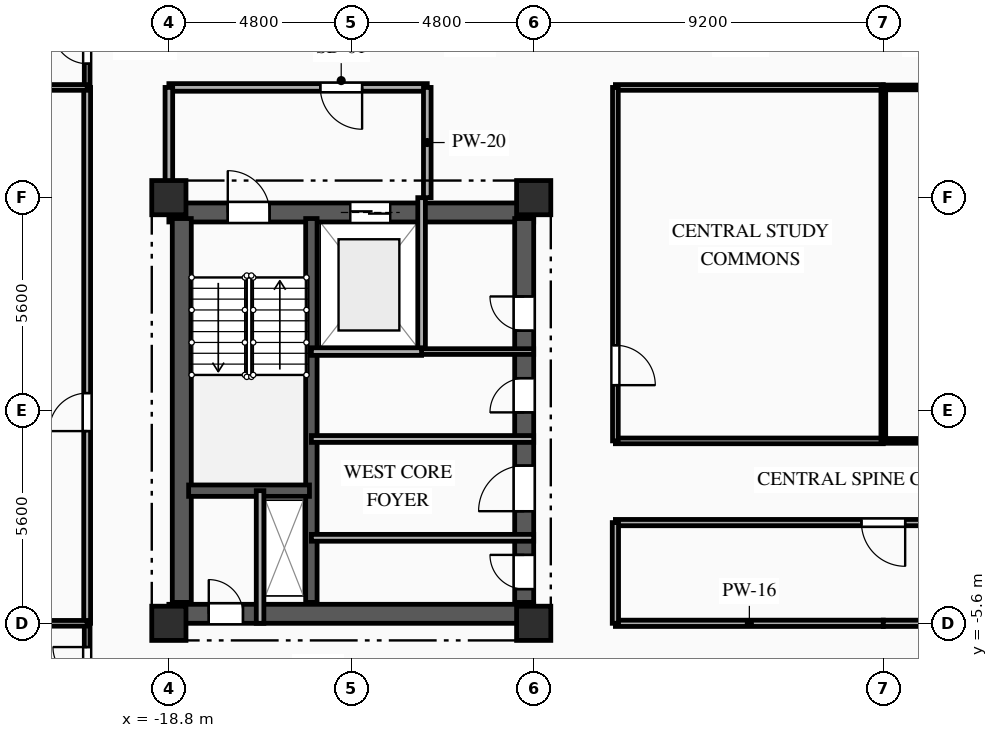
"""IFC4 building model, lengths in metres.
Left out: names, types, materials, properties, quantities, classifications, styles, units other than length and angle.
Written with IfcOpenShell. Run it as: python <this file> out.ifc"""

import sys

from ifc_helpers import new_model, si_unit, direction, frame, frame_2d, origin, origin_2d, place, context, subcontext, project, spatial, rectangle, extrude, element, fill, save


model = new_model("IFC4")
c1 = context("Model", 3, precision=1e-05, world=origin(), true_north=direction((0.0, 1.0)))
c2 = subcontext(c1, "Body", "Model", "MODEL_VIEW")
j1 = project(units=[si_unit("LENGTHUNIT", "METRE"), si_unit("PLANEANGLEUNIT", "RADIAN")], contexts=[c1])
p1 = place(None, origin())
s1 = spatial("IfcSite", under=j1, at=p1, CompositionType="ELEMENT")
p2 = place(p1, origin())
s2 = spatial("IfcBuilding", under=s1, at=p2, CompositionType="ELEMENT")
p3 = place(p2, frame((0.0, 0.0, 137.7)))
s3 = spatial("IfcBuildingStorey", under=s2, at=p3, CompositionType="ELEMENT", Elevation=137.7)
for number, where, z_axis, x_axis in (
    (1, (-18.8, -5.6, 0.0), (0.0, 0.0, 1.0), (1.0, 0.0, 0.0)),
    (2, (-18.8, 5.6, 0.0), (0.0, 0.0, 1.0), (1.0, 0.0, 0.0)),
    (3, (-9.2, -5.6, 0.0), (0.0, 0.0, 1.0), (1.0, 0.0, 0.0)),
    (4, (-9.2, 5.6, 0.0), (0.0, 0.0, 1.0), (1.0, 0.0, 0.0)),
):
    element("IfcColumn", number, at=place(p3, frame(where, z_axis=z_axis, x_axis=x_axis)), inside=s3, PredefinedType="COLUMN", context=c2, shape_type="SweptSolid", body=[
        extrude(rectangle(XDim=0.9, YDim=0.9, at=origin_2d()), origin(), (0.0, 0.0, 1.0), 3.35),
    ])
p4 = place(p3, frame((-18.8, 5.21, 0.0), z_axis=(0.0, 0.0, 1.0), x_axis=(1.0, 0.0, 0.0)))
e5 = element("IfcWall", 5, at=p4, inside=s3, PredefinedType="SHEAR", context=c2, shape_type="SweptSolid", body=[
    extrude(rectangle(XDim=9.6, YDim=0.5, at=frame_2d((4.8, 0.0))), origin(), (0.0, 0.0, 1.0), 3.04),
])
p5 = place(p4, frame((1.55, 0.0, 0.0)))
e6 = element("IfcOpeningElement", 6, at=p5, cuts=e5, PredefinedType="OPENING", context=c2, shape_type="SweptSolid", body=[
    extrude(rectangle(XDim=1.1, YDim=2.15, at=frame_2d((0.55, 1.075))), frame((0.0, 0.26, 0.0), z_axis=(0.0, -1.0, 0.0), x_axis=(1.0, 0.0, 0.0)), (0.0, 0.0, 1.0), 0.52),
])
p6 = place(p4, frame((4.775, 0.0, 0.0)))
e7 = element("IfcOpeningElement", 7, at=p6, cuts=e5, PredefinedType="OPENING", context=c2, shape_type="SweptSolid", body=[
    extrude(rectangle(XDim=1.05, YDim=2.1, at=frame_2d((0.525, 1.05))), frame((0.0, 0.26, 0.0), z_axis=(0.0, -1.0, 0.0), x_axis=(1.0, 0.0, 0.0)), (0.0, 0.0, 1.0), 0.52),
])
p7 = place(p3, frame((-18.8, -5.35, 0.0), z_axis=(0.0, 0.0, 1.0), x_axis=(1.0, 0.0, 0.0)))
e8 = element("IfcWall", 8, at=p7, inside=s3, PredefinedType="SHEAR", context=c2, shape_type="SweptSolid", body=[
    extrude(rectangle(XDim=9.6, YDim=0.5, at=frame_2d((4.8, 0.0))), origin(), (0.0, 0.0, 1.0), 3.04),
])
p8 = place(p7, frame((1.05, 0.0, 0.0)))
e9 = element("IfcOpeningElement", 9, at=p8, cuts=e8, PredefinedType="OPENING", context=c2, shape_type="SweptSolid", body=[
    extrude(rectangle(XDim=0.9, YDim=2.1, at=frame_2d((0.45, 1.05))), frame((0.0, 0.26, 0.0), z_axis=(0.0, -1.0, 0.0), x_axis=(1.0, 0.0, 0.0)), (0.0, 0.0, 1.0), 0.52),
])
p9 = place(p3, frame((-18.46, -5.05, 0.0), z_axis=(0.0, 0.0, 1.0), x_axis=(0.0, 1.0, 0.0)))
e10 = element("IfcWall", 10, at=p9, inside=s3, PredefinedType="SHEAR", context=c2, shape_type="SweptSolid", body=[
    extrude(rectangle(XDim=10.1, YDim=0.5, at=frame_2d((5.05, 0.0))), origin(), (0.0, 0.0, 1.0), 3.04),
])
p10 = place(p3, frame((-9.45, -5.05, 0.0), z_axis=(0.0, 0.0, 1.0), x_axis=(0.0, 1.0, 0.0)))
e11 = element("IfcWall", 11, at=p10, inside=s3, PredefinedType="SHEAR", context=c2, shape_type="SweptSolid", body=[
    extrude(rectangle(XDim=10.1, YDim=0.5, at=frame_2d((5.05, 0.0))), origin(), (0.0, 0.0, 1.0), 3.04),
])
p11 = place(p10, frame((7.15, 0.0, 0.0)))
e12 = element("IfcOpeningElement", 12, at=p11, cuts=e11, PredefinedType="OPENING", context=c2, shape_type="SweptSolid", body=[
    extrude(rectangle(XDim=0.9, YDim=2.1, at=frame_2d((0.45, 1.05))), frame((0.0, 0.26, 0.0), z_axis=(0.0, -1.0, 0.0), x_axis=(1.0, 0.0, 0.0)), (0.0, 0.0, 1.0), 0.52),
])
p12 = place(p10, frame((2.4, 0.0, 0.0)))
e13 = element("IfcOpeningElement", 13, at=p12, cuts=e11, PredefinedType="OPENING", context=c2, shape_type="SweptSolid", body=[
    extrude(rectangle(XDim=1.2, YDim=2.15, at=frame_2d((0.6, 1.075))), frame((0.0, 0.26, 0.0), z_axis=(0.0, -1.0, 0.0), x_axis=(1.0, 0.0, 0.0)), (0.0, 0.0, 1.0), 0.52),
])
p13 = place(p10, frame((0.35, 0.0, 0.0)))
e14 = element("IfcOpeningElement", 14, at=p13, cuts=e11, PredefinedType="OPENING", context=c2, shape_type="SweptSolid", body=[
    extrude(rectangle(XDim=0.9, YDim=2.1, at=frame_2d((0.45, 1.05))), frame((0.0, 0.26, 0.0), z_axis=(0.0, -1.0, 0.0), x_axis=(1.0, 0.0, 0.0)), (0.0, 0.0, 1.0), 0.52),
])
p14 = place(p10, frame((5.0, 0.0, 0.0)))
e15 = element("IfcOpeningElement", 15, at=p14, cuts=e11, PredefinedType="OPENING", context=c2, shape_type="SweptSolid", body=[
    extrude(rectangle(XDim=0.9, YDim=2.1, at=frame_2d((0.45, 1.05))), frame((0.0, 0.26, 0.0), z_axis=(0.0, -1.0, 0.0), x_axis=(1.0, 0.0, 0.0)), (0.0, 0.0, 1.0), 0.52),
])
p15 = place(p3, frame((-15.05, -5.05, 0.0), z_axis=(0.0, 0.0, 1.0), x_axis=(0.0, 1.0, 0.0)))
e16 = element("IfcWall", 16, at=p15, inside=s3, PredefinedType="SHEAR", context=c2, shape_type="SweptSolid", body=[
    extrude(rectangle(XDim=10.1, YDim=0.3, at=frame_2d((5.05, 0.0))), origin(), (0.0, 0.0, 1.0), 3.04),
])
p16 = place(p3, frame((-18.28, -2.11, 0.0), z_axis=(0.0, 0.0, 1.0), x_axis=(1.0, 0.0, 0.0)))
e17 = element("IfcWall", 17, at=p16, inside=s3, PredefinedType="SHEAR", context=c2, shape_type="SweptSolid", body=[
    extrude(rectangle(XDim=3.18, YDim=0.3, at=frame_2d((1.59, 0.0))), origin(), (0.0, 0.0, 1.0), 3.04),
])
p17 = place(p3, frame((-16.4, -5.6, 0.0), z_axis=(0.0, 0.0, 1.0), x_axis=(0.0, 1.0, 0.0)))
e18 = element("IfcWall", 18, at=p17, inside=s3, PredefinedType="PARTITIONING", context=c2, shape_type="SweptSolid", body=[
    extrude(rectangle(XDim=3.49, YDim=0.2, at=frame_2d((1.745, 0.0))), origin(), (0.0, 0.0, 1.0), 3.04),
])
p18 = place(p3, frame((-12.15, 1.55, 0.0), z_axis=(0.0, 0.0, 1.0), x_axis=(0.0, 1.0, 0.0)))
e19 = element("IfcWall", 19, at=p18, inside=s3, PredefinedType="PARTITIONING", context=c2, shape_type="SweptSolid", body=[
    extrude(rectangle(XDim=4.05, YDim=0.2, at=frame_2d((2.025, 0.0))), origin(), (0.0, 0.0, 1.0), 3.04),
])
p19 = place(p3, frame((-12.0, 8.5, 0.0), z_axis=(0.0, 0.0, 1.0), x_axis=(-1.0, 0.0, 0.0)))
e20 = element("IfcWall", 20, at=p19, inside=s3, PredefinedType="PARTITIONING", context=c2, shape_type="SweptSolid", body=[
    extrude(rectangle(XDim=6.8, YDim=0.2, at=frame_2d((3.4, 0.0))), origin(), (0.0, 0.0, 1.0), 3.04),
])
p20 = place(p19, frame((1.715, 0.0, 0.0)))
e21 = element("IfcOpeningElement", 21, at=p20, cuts=e20, PredefinedType="OPENING", context=c2, shape_type="SweptSolid", body=[
    extrude(rectangle(XDim=1.1, YDim=2.15, at=frame_2d((0.55, 1.075))), frame((0.0, 0.11, 0.0), z_axis=(0.0, -1.0, 0.0), x_axis=(1.0, 0.0, 0.0)), (0.0, 0.0, 1.0), 0.22),
])
p21 = place(p3, frame((-18.8, 8.5, 0.0), z_axis=(0.0, 0.0, 1.0), x_axis=(0.0, -1.0, 0.0)))
e22 = element("IfcWall", 22, at=p21, inside=s3, PredefinedType="PARTITIONING", context=c2, shape_type="SweptSolid", body=[
    extrude(rectangle(XDim=2.9, YDim=0.2, at=frame_2d((1.45, 0.0))), origin(), (0.0, 0.0, 1.0), 2.525),
])
p22 = place(p3, frame((-12.0, 5.6, 0.0), z_axis=(0.0, 0.0, 1.0), x_axis=(0.0, 1.0, 0.0)))
e23 = element("IfcWall", 23, at=p22, inside=s3, PredefinedType="PARTITIONING", context=c2, shape_type="SweptSolid", body=[
    extrude(rectangle(XDim=2.9, YDim=0.2, at=frame_2d((1.45, 0.0))), origin(), (0.0, 0.0, 1.0), 3.04),
])
p23 = place(p3, frame((-12.15, 1.55, 0.0), z_axis=(0.0, 0.0, 1.0), x_axis=(1.0, 0.0, 0.0)))
e24 = element("IfcWall", 24, at=p23, inside=s3, PredefinedType="PARTITIONING", context=c2, shape_type="SweptSolid", body=[
    extrude(rectangle(XDim=2.95, YDim=0.15, at=frame_2d((1.475, 0.0))), origin(), (0.0, 0.0, 1.0), 3.04),
])
p24 = place(p3, frame((-15.05, -3.35, 0.0), z_axis=(0.0, 0.0, 1.0), x_axis=(1.0, 0.0, 0.0)))
e25 = element("IfcWall", 25, at=p24, inside=s3, PredefinedType="PARTITIONING", context=c2, shape_type="SweptSolid", body=[
    extrude(rectangle(XDim=5.85, YDim=0.18, at=frame_2d((2.925, 0.0))), origin(), (0.0, 0.0, 1.0), 2.755),
])
p25 = place(p3, frame((-9.2, -0.75, 0.0), z_axis=(0.0, 0.0, 1.0), x_axis=(-1.0, 0.0, 0.0)))
e26 = element("IfcWall", 26, at=p25, inside=s3, PredefinedType="PARTITIONING", context=c2, shape_type="SweptSolid", body=[
    extrude(rectangle(XDim=5.85, YDim=0.18, at=frame_2d((2.925, 0.0))), origin(), (0.0, 0.0, 1.0), 3.04),
])
p26 = place(p3, frame((-20.95, 8.5, 0.0), z_axis=(0.0, 0.0, 1.0), x_axis=(0.0, 1.0, 0.0)))
e27 = element("IfcWall", 27, at=p26, inside=s3, PredefinedType="PARTITIONING", context=c2, shape_type="SweptSolid", body=[
    extrude(rectangle(XDim=2.15, YDim=0.15, at=frame_2d((1.075, 0.0))), origin(), (0.0, 0.0, 1.0), 3.04),
])
p27 = place(p26, frame((0.625, 0.0, 0.0)))
e28 = element("IfcOpeningElement", 28, at=p27, cuts=e27, PredefinedType="OPENING", context=c2, shape_type="SweptSolid", body=[
    extrude(rectangle(XDim=0.9, YDim=2.1, at=frame_2d((0.45, 1.05))), frame((0.0, 0.085, 0.0), z_axis=(0.0, -1.0, 0.0), x_axis=(1.0, 0.0, 0.0)), (0.0, 0.0, 1.0), 0.17),
])
p28 = place(p3, frame((0.0, 8.5, 0.0), z_axis=(0.0, 0.0, 1.0), x_axis=(-1.0, 0.0, 0.0)))
e29 = element("IfcWall", 29, at=p28, inside=s3, PredefinedType="PARTITIONING", context=c2, shape_type="SweptSolid", body=[
    extrude(rectangle(XDim=7.05, YDim=0.15, at=frame_2d((3.525, 0.0))), origin(), (0.0, 0.0, 1.0), 3.04),
])
p29 = place(p3, frame((7.05, 8.5, 0.0), z_axis=(0.0, 0.0, 1.0), x_axis=(-1.0, 0.0, 0.0)))
e30 = element("IfcWall", 30, at=p29, inside=s3, PredefinedType="PARTITIONING", context=c2, shape_type="SweptSolid", body=[
    extrude(rectangle(XDim=7.05, YDim=0.125, at=frame_2d((3.525, 0.0))), origin(), (0.0, 0.0, 1.0), 3.04),
])
p30 = place(p3, frame((-20.95, -7.75, 0.0), z_axis=(0.0, 0.0, 1.0), x_axis=(0.0, 1.0, 0.0)))
e31 = element("IfcWall", 31, at=p30, inside=s3, PredefinedType="PARTITIONING", context=c2, shape_type="SweptSolid", body=[
    extrude(rectangle(XDim=2.15, YDim=0.15, at=frame_2d((1.075, 0.0))), origin(), (0.0, 0.0, 1.0), 3.04),
])
p31 = place(p30, frame((0.625, 0.0, 0.0)))
e32 = element("IfcOpeningElement", 32, at=p31, cuts=e31, PredefinedType="OPENING", context=c2, shape_type="SweptSolid", body=[
    extrude(rectangle(XDim=0.9, YDim=2.1, at=frame_2d((0.45, 1.05))), frame((0.0, 0.085, 0.0), z_axis=(0.0, -1.0, 0.0), x_axis=(1.0, 0.0, 0.0)), (0.0, 0.0, 1.0), 0.17),
])
for number, where, z_axis, x_axis in (
    (33, (-7.05, -5.6, 0.0), (0.0, 0.0, 1.0), (1.0, 0.0, 0.0)),
    (34, (0.0, -5.6, 0.0), (0.0, 0.0, 1.0), (1.0, 0.0, 0.0)),
):
    element("IfcWall", number, at=place(p3, frame(where, z_axis=z_axis, x_axis=x_axis)), inside=s3, PredefinedType="PARTITIONING", context=c2, shape_type="SweptSolid", body=[
        extrude(rectangle(XDim=7.05, YDim=0.165, at=frame_2d((3.525, 0.0))), origin(), (0.0, 0.0, 1.0), 2.525),
    ])
p32 = place(p3, frame((-20.95, -5.6, 0.0), z_axis=(0.0, 0.0, 1.0), x_axis=(0.0, 1.0, 0.0)))
e35 = element("IfcWall", 35, at=p32, inside=s3, PredefinedType="PARTITIONING", context=c2, shape_type="SweptSolid", body=[
    extrude(rectangle(XDim=14.1, YDim=0.18, at=frame_2d((7.05, 0.0))), origin(), (0.0, 0.0, 1.0), 3.04),
])
p33 = place(p32, frame((5.058, 0.0, 0.0)))
e36 = element("IfcOpeningElement", 36, at=p33, cuts=e35, PredefinedType="OPENING", context=c2, shape_type="SweptSolid", body=[
    extrude(rectangle(XDim=1.0, YDim=2.15, at=frame_2d((0.5, 1.075))), frame((0.0, 0.1, 0.0), z_axis=(0.0, -1.0, 0.0), x_axis=(1.0, 0.0, 0.0)), (0.0, 0.0, 1.0), 0.2),
])
p34 = place(p3, frame((-7.05, -0.8, 0.0), z_axis=(0.0, 0.0, 1.0), x_axis=(1.0, 0.0, 0.0)))
e37 = element("IfcWall", 37, at=p34, inside=s3, PredefinedType="PARTITIONING", context=c2, shape_type="SweptSolid", body=[
    extrude(rectangle(XDim=7.05, YDim=0.15, at=frame_2d((3.525, 0.0))), origin(), (0.0, 0.0, 1.0), 3.04),
])
p35 = place(p3, frame((0.0, -0.8, 0.0), z_axis=(0.0, 0.0, 1.0), x_axis=(1.0, 0.0, 0.0)))
e38 = element("IfcWall", 38, at=p35, inside=s3, PredefinedType="PARTITIONING", context=c2, shape_type="SweptSolid", body=[
    extrude(rectangle(XDim=7.05, YDim=0.125, at=frame_2d((3.525, 0.0))), origin(), (0.0, 0.0, 1.0), 3.04),
])
p36 = place(p3, frame((7.05, -2.95, 0.0), z_axis=(0.0, 0.0, 1.0), x_axis=(-1.0, 0.0, 0.0)))
e39 = element("IfcWall", 39, at=p36, inside=s3, PredefinedType="PARTITIONING", context=c2, shape_type="SweptSolid", body=[
    extrude(rectangle(XDim=14.1, YDim=0.165, at=frame_2d((7.05, 0.0))), origin(), (0.0, 0.0, 1.0), 3.04),
])
p37 = place(p36, frame((6.475, 0.0, 0.0)))
e40 = element("IfcOpeningElement", 40, at=p37, cuts=e39, PredefinedType="OPENING", context=c2, shape_type="SweptSolid", body=[
    extrude(rectangle(XDim=1.15, YDim=2.15, at=frame_2d((0.575, 1.075))), frame((0.0, 0.093, 0.0), z_axis=(0.0, -1.0, 0.0), x_axis=(1.0, 0.0, 0.0)), (0.0, 0.0, 1.0), 0.185),
])
p38 = place(p3, frame((-7.05, 8.5, 0.0), z_axis=(0.0, 0.0, 1.0), x_axis=(0.0, -1.0, 0.0)))
e41 = element("IfcWall", 41, at=p38, inside=s3, PredefinedType="PARTITIONING", context=c2, shape_type="SweptSolid", body=[
    extrude(rectangle(XDim=9.3, YDim=0.15, at=frame_2d((4.65, 0.0))), origin(), (0.0, 0.0, 1.0), 3.04),
])
p39 = place(p38, frame((6.784, 0.0, 0.0)))
e42 = element("IfcOpeningElement", 42, at=p39, cuts=e41, PredefinedType="OPENING", context=c2, shape_type="SweptSolid", body=[
    extrude(rectangle(XDim=1.05, YDim=2.15, at=frame_2d((0.525, 1.075))), frame((0.0, 0.085, 0.0), z_axis=(0.0, -1.0, 0.0), x_axis=(1.0, 0.0, 0.0)), (0.0, 0.0, 1.0), 0.17),
])
p40 = place(p3, frame((-7.05, -2.95, 0.0), z_axis=(0.0, 0.0, 1.0), x_axis=(0.0, -1.0, 0.0)))
e43 = element("IfcWall", 43, at=p40, inside=s3, PredefinedType="PARTITIONING", context=c2, shape_type="SweptSolid", body=[
    extrude(rectangle(XDim=2.65, YDim=0.165, at=frame_2d((1.325, 0.0))), origin(), (0.0, 0.0, 1.0), 3.04),
])
p41 = place(p3, frame((-23.6, 8.5, 0.0), z_axis=(0.0, 0.0, 1.0), x_axis=(1.0, 0.0, 0.0)))
e44 = element("IfcWall", 44, at=p41, inside=s3, PredefinedType="PARTITIONING", context=c2, shape_type="SweptSolid", body=[
    extrude(rectangle(XDim=2.65, YDim=0.15, at=frame_2d((1.325, 0.0))), origin(), (0.0, 0.0, 1.0), 3.04),
])
p42 = place(p41, frame((0.635, 0.0, 0.0)))
e45 = element("IfcOpeningElement", 45, at=p42, cuts=e44, PredefinedType="OPENING", context=c2, shape_type="SweptSolid", body=[
    extrude(rectangle(XDim=1.05, YDim=2.15, at=frame_2d((0.525, 1.075))), frame((0.0, 0.085, 0.0), z_axis=(0.0, -1.0, 0.0), x_axis=(1.0, 0.0, 0.0)), (0.0, 0.0, 1.0), 0.17),
])
p43 = place(p3, frame((-20.95, -5.6, 0.0), z_axis=(0.0, 0.0, 1.0), x_axis=(-1.0, 0.0, 0.0)))
e46 = element("IfcWall", 46, at=p43, inside=s3, PredefinedType="PARTITIONING", context=c2, shape_type="SweptSolid", body=[
    extrude(rectangle(XDim=2.65, YDim=0.15, at=frame_2d((1.325, 0.0))), origin(), (0.0, 0.0, 1.0), 3.04),
])
p44 = place(p43, frame((0.965, 0.0, 0.0)))
e47 = element("IfcOpeningElement", 47, at=p44, cuts=e46, PredefinedType="OPENING", context=c2, shape_type="SweptSolid", body=[
    extrude(rectangle(XDim=1.05, YDim=2.15, at=frame_2d((0.525, 1.075))), frame((0.0, 0.085, 0.0), z_axis=(0.0, -1.0, 0.0), x_axis=(1.0, 0.0, 0.0)), (0.0, 0.0, 1.0), 0.17),
])
p45 = place(p3, frame((0.0, 8.5, 0.0), z_axis=(0.0, 0.0, 1.0), x_axis=(0.0, -1.0, 0.0)))
e48 = element("IfcWall", 48, at=p45, inside=s3, PredefinedType="PARTITIONING", context=c2, shape_type="SweptSolid", body=[
    extrude(rectangle(XDim=9.3, YDim=0.125, at=frame_2d((4.65, 0.0))), origin(), (0.0, 0.0, 1.0), 3.04),
])
p46 = place(p3, frame((-15.05, 1.55, 0.0), z_axis=(0.0, 0.0, 1.0), x_axis=(1.0, 0.0, 0.0)))
e49 = element("IfcWall", 49, at=p46, inside=s3, PredefinedType="PARTITIONING", context=c2, shape_type="SweptSolid", body=[
    extrude(rectangle(XDim=2.9, YDim=0.2, at=frame_2d((1.45, 0.0))), origin(), (0.0, 0.0, 1.0), 3.04),
])
p47 = place(p5, origin())
e50 = element("IfcDoor", 50, at=p47, inside=s3, OperationType="SINGLE_SWING_LEFT", PredefinedType="DOOR", context=c2, shape_type="SweptSolid", body=[
    extrude(rectangle(XDim=1.1, YDim=2.15, at=frame_2d((0.55, 1.075))), frame((0.0, 0.025, 0.0), z_axis=(0.0, -1.0, 0.0), x_axis=(1.0, 0.0, 0.0)), (0.0, 0.0, 1.0), 0.05),
])
fill(e6, e50)
p48 = place(p6, origin())
e51 = element("IfcDoor", 51, at=p48, inside=s3, OperationType="DOUBLE_DOOR_SLIDING", PredefinedType="DOOR", context=c2, shape_type="SweptSolid", body=[
    extrude(rectangle(XDim=1.05, YDim=2.1, at=frame_2d((0.525, 1.05))), frame((0.0, 0.025, 0.0), z_axis=(0.0, -1.0, 0.0), x_axis=(1.0, 0.0, 0.0)), (0.0, 0.0, 1.0), 0.05),
])
fill(e7, e51)
p49 = place(p8, origin())
e52 = element("IfcDoor", 52, at=p49, inside=s3, OperationType="SINGLE_SWING_LEFT", PredefinedType="DOOR", context=c2, shape_type="SweptSolid", body=[
    extrude(rectangle(XDim=0.9, YDim=2.1, at=frame_2d((0.45, 1.05))), frame((0.0, 0.025, 0.0), z_axis=(0.0, -1.0, 0.0), x_axis=(1.0, 0.0, 0.0)), (0.0, 0.0, 1.0), 0.05),
])
fill(e9, e52)
p50 = place(p20, origin())
e53 = element("IfcDoor", 53, at=p50, inside=s3, OperationType="SINGLE_SWING_LEFT", PredefinedType="DOOR", context=c2, shape_type="SweptSolid", body=[
    extrude(rectangle(XDim=1.1, YDim=2.15, at=frame_2d((0.55, 1.075))), frame((0.0, 0.025, 0.0), z_axis=(0.0, -1.0, 0.0), x_axis=(1.0, 0.0, 0.0)), (0.0, 0.0, 1.0), 0.05),
])
fill(e21, e53)
p51 = place(p11, origin())
e54 = element("IfcDoor", 54, at=p51, inside=s3, OperationType="SINGLE_SWING_RIGHT", PredefinedType="DOOR", context=c2, shape_type="SweptSolid", body=[
    extrude(rectangle(XDim=0.9, YDim=2.1, at=frame_2d((0.45, 1.05))), frame((0.0, 0.025, 0.0), z_axis=(0.0, -1.0, 0.0), x_axis=(1.0, 0.0, 0.0)), (0.0, 0.0, 1.0), 0.05),
])
fill(e12, e54)
p52 = place(p12, origin())
e55 = element("IfcDoor", 55, at=p52, inside=s3, OperationType="SINGLE_SWING_LEFT", PredefinedType="DOOR", context=c2, shape_type="SweptSolid", body=[
    extrude(rectangle(XDim=1.2, YDim=2.15, at=frame_2d((0.6, 1.075))), frame((0.0, 0.025, 0.0), z_axis=(0.0, -1.0, 0.0), x_axis=(1.0, 0.0, 0.0)), (0.0, 0.0, 1.0), 0.05),
])
fill(e13, e55)
p53 = place(p13, origin())
e56 = element("IfcDoor", 56, at=p53, inside=s3, OperationType="SINGLE_SWING_RIGHT", PredefinedType="DOOR", context=c2, shape_type="SweptSolid", body=[
    extrude(rectangle(XDim=0.9, YDim=2.1, at=frame_2d((0.45, 1.05))), frame((0.0, 0.025, 0.0), z_axis=(0.0, -1.0, 0.0), x_axis=(1.0, 0.0, 0.0)), (0.0, 0.0, 1.0), 0.05),
])
fill(e14, e56)
p54 = place(p14, origin())
e57 = element("IfcDoor", 57, at=p54, inside=s3, OperationType="SINGLE_SWING_LEFT", PredefinedType="DOOR", context=c2, shape_type="SweptSolid", body=[
    extrude(rectangle(XDim=0.9, YDim=2.1, at=frame_2d((0.45, 1.05))), frame((0.0, 0.025, 0.0), z_axis=(0.0, -1.0, 0.0), x_axis=(1.0, 0.0, 0.0)), (0.0, 0.0, 1.0), 0.05),
])
fill(e15, e57)
p55 = place(p27, origin())
e58 = element("IfcDoor", 58, at=p55, inside=s3, OperationType="SINGLE_SWING_RIGHT", PredefinedType="DOOR", context=c2, shape_type="SweptSolid", body=[
    extrude(rectangle(XDim=0.9, YDim=2.1, at=frame_2d((0.45, 1.05))), frame((0.0, 0.025, 0.0), z_axis=(0.0, -1.0, 0.0), x_axis=(1.0, 0.0, 0.0)), (0.0, 0.0, 1.0), 0.05),
])
fill(e28, e58)
p56 = place(p31, origin())
e59 = element("IfcDoor", 59, at=p56, inside=s3, OperationType="SINGLE_SWING_RIGHT", PredefinedType="DOOR", context=c2, shape_type="SweptSolid", body=[
    extrude(rectangle(XDim=0.9, YDim=2.1, at=frame_2d((0.45, 1.05))), frame((0.0, 0.025, 0.0), z_axis=(0.0, -1.0, 0.0), x_axis=(1.0, 0.0, 0.0)), (0.0, 0.0, 1.0), 0.05),
])
fill(e32, e59)
p57 = place(p33, origin())
e60 = element("IfcDoor", 60, at=p57, inside=s3, OperationType="SINGLE_SWING_LEFT", PredefinedType="DOOR", context=c2, shape_type="SweptSolid", body=[
    extrude(rectangle(XDim=1.0, YDim=2.15, at=frame_2d((0.5, 1.075))), frame((0.0, 0.025, 0.0), z_axis=(0.0, -1.0, 0.0), x_axis=(1.0, 0.0, 0.0)), (0.0, 0.0, 1.0), 0.05),
])
fill(e36, e60)
p58 = place(p37, origin())
e61 = element("IfcDoor", 61, at=p58, inside=s3, OperationType="SINGLE_SWING_LEFT", PredefinedType="DOOR", context=c2, shape_type="SweptSolid", body=[
    extrude(rectangle(XDim=1.15, YDim=2.15, at=frame_2d((0.575, 1.075))), frame((0.0, 0.025, 0.0), z_axis=(0.0, -1.0, 0.0), x_axis=(1.0, 0.0, 0.0)), (0.0, 0.0, 1.0), 0.05),
])
fill(e40, e61)
p59 = place(p39, origin())
e62 = element("IfcDoor", 62, at=p59, inside=s3, OperationType="SINGLE_SWING_RIGHT", PredefinedType="DOOR", context=c2, shape_type="SweptSolid", body=[
    extrude(rectangle(XDim=1.05, YDim=2.15, at=frame_2d((0.525, 1.075))), frame((0.0, 0.025, 0.0), z_axis=(0.0, -1.0, 0.0), x_axis=(1.0, 0.0, 0.0)), (0.0, 0.0, 1.0), 0.05),
])
fill(e42, e62)
save(model, sys.argv[1])
